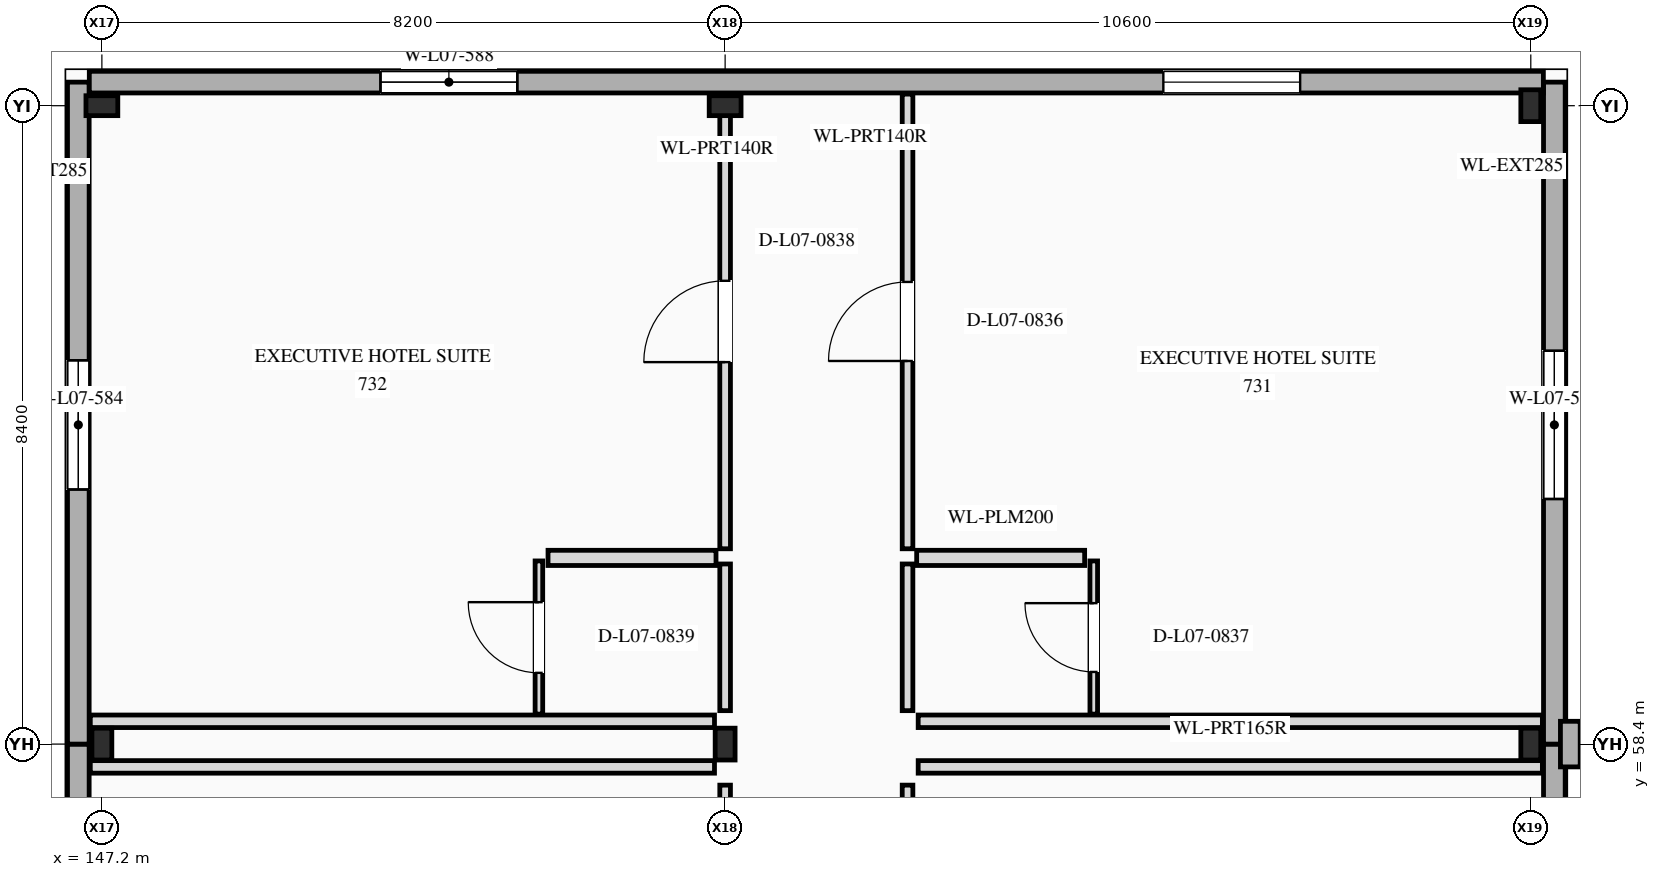
"""IFC4 building model, lengths in metres.
Left out: names, types, materials, properties, quantities, classifications, styles, units other than length and angle.
Written with IfcOpenShell. Run it as: python <this file> out.ifc"""

import sys

from ifc_helpers import new_model, si_unit, direction, frame, frame_2d, origin, origin_2d, place, context, subcontext, project, spatial, rectangle, i_section, extrude, element, fill, save


model = new_model("IFC4")
c1 = context("Model", 3, precision=1e-05, world=origin(), true_north=direction((0.0, 1.0)))
c2 = subcontext(c1, "Body", "Model", "MODEL_VIEW")
j1 = project(units=[si_unit("LENGTHUNIT", "METRE"), si_unit("PLANEANGLEUNIT", "RADIAN")], contexts=[c1])
p1 = place(None, origin())
s1 = spatial("IfcSite", under=j1, at=p1, CompositionType="ELEMENT")
p2 = place(p1, origin())
s2 = spatial("IfcBuilding", under=s1, at=p2, CompositionType="ELEMENT")
p3 = place(p2, frame((0.0, 0.0, 30.6)))
s3 = spatial("IfcBuildingStorey", under=s2, at=p3, CompositionType="ELEMENT", Elevation=30.6)
for number, where, z_axis, x_axis in (
    (1, (147.2, 58.4, 0.0), (0.0, 0.0, 1.0), (1.0, 0.0, 0.0)),
    (2, (147.2, 66.8, 0.0), (0.0, 0.0, 1.0), (0.0, 1.0, 0.0)),
    (3, (155.4, 58.4, 0.0), (0.0, 0.0, 1.0), (1.0, 0.0, 0.0)),
    (4, (155.4, 66.8, 0.0), (0.0, 0.0, 1.0), (0.0, 1.0, 0.0)),
    (5, (166.0, 58.4, 0.0), (0.0, 0.0, 1.0), (1.0, 0.0, 0.0)),
    (6, (166.0, 66.8, 0.0), (0.0, 0.0, 1.0), (1.0, 0.0, 0.0)),
):
    element("IfcColumn", number, at=place(p3, frame(where, z_axis=z_axis, x_axis=x_axis)), inside=s3, PredefinedType="COLUMN", context=c2, shape_type="SweptSolid", body=[
        extrude(i_section(OverallWidth=0.262, OverallDepth=0.419, WebThickness=0.012, FlangeThickness=0.019, at=origin_2d()), origin(), (0.0, 0.0, 1.0), 3.5),
    ])
p4 = place(p3, frame((166.31, 56.26, 0.0), z_axis=(0.0, 0.0, 1.0), x_axis=(0.0, 1.0, 0.0)))
e7 = element("IfcWall", 7, at=p4, inside=s3, PredefinedType="STANDARD", context=c2, shape_type="SweptSolid", body=[
    extrude(rectangle(XDim=2.14, YDim=0.285, at=frame_2d((1.07, 0.0))), origin(), (0.0, 0.0, 1.0), 3.5),
])
p5 = place(p3, frame((166.31, 58.4, 0.0), z_axis=(0.0, 0.0, 1.0), x_axis=(0.0, 1.0, 0.0)))
e8 = element("IfcWall", 8, at=p5, inside=s3, PredefinedType="STANDARD", context=c2, shape_type="SweptSolid", body=[
    extrude(rectangle(XDim=8.71, YDim=0.285, at=frame_2d((4.355, 0.0))), origin(), (0.0, 0.0, 1.0), 3.5),
])
p6 = place(p5, frame((3.225, 0.0, 0.85)))
e9 = element("IfcOpeningElement", 9, at=p6, cuts=e8, PredefinedType="OPENING", context=c2, shape_type="SweptSolid", body=[
    extrude(rectangle(XDim=1.95, YDim=1.85, at=frame_2d((0.975, 0.925))), frame((0.0, 0.152, 0.0), z_axis=(0.0, -1.0, 0.0), x_axis=(1.0, 0.0, 0.0)), (0.0, 0.0, 1.0), 0.305),
])
p7 = place(p3, frame((166.52, 58.1, 0.0), z_axis=(0.0, 0.0, 1.0), x_axis=(0.0, 1.0, 0.0)))
e10 = element("IfcWall", 10, at=p7, inside=s3, PredefinedType="ELEMENTEDWALL", context=c2, shape_type="SweptSolid", body=[
    extrude(rectangle(XDim=0.6, YDim=0.26, at=frame_2d((0.3, 0.0))), origin(), (0.0, 0.0, 1.0), 3.5),
])
p8 = place(p3, frame((146.89, 50.0, 0.0), z_axis=(0.0, 0.0, 1.0), x_axis=(0.0, 1.0, 0.0)))
e11 = element("IfcWall", 11, at=p8, inside=s3, PredefinedType="STANDARD", context=c2, shape_type="SweptSolid", body=[
    extrude(rectangle(XDim=8.4, YDim=0.285, at=frame_2d((4.2, 0.0))), origin(), (0.0, 0.0, 1.0), 3.5),
])
p9 = place(p8, frame((2.95, 0.0, 0.85)))
e12 = element("IfcOpeningElement", 12, at=p9, cuts=e11, PredefinedType="OPENING", context=c2, shape_type="SweptSolid", body=[
    extrude(rectangle(XDim=2.5, YDim=1.75, at=frame_2d((1.25, 0.875))), frame((0.0, 0.152, 0.0), z_axis=(0.0, -1.0, 0.0), x_axis=(1.0, 0.0, 0.0)), (0.0, 0.0, 1.0), 0.305),
])
p10 = place(p3, frame((146.89, 58.4, 0.0), z_axis=(0.0, 0.0, 1.0), x_axis=(0.0, 1.0, 0.0)))
e13 = element("IfcWall", 13, at=p10, inside=s3, PredefinedType="STANDARD", context=c2, shape_type="SweptSolid", body=[
    extrude(rectangle(XDim=8.71, YDim=0.285, at=frame_2d((4.355, 0.0))), origin(), (0.0, 0.0, 1.0), 3.5),
])
p11 = place(p10, frame((3.35, 0.0, 0.85)))
e14 = element("IfcOpeningElement", 14, at=p11, cuts=e13, PredefinedType="OPENING", context=c2, shape_type="SweptSolid", body=[
    extrude(rectangle(XDim=1.7, YDim=1.6, at=frame_2d((0.85, 0.8))), frame((0.0, 0.152, 0.0), z_axis=(0.0, -1.0, 0.0), x_axis=(1.0, 0.0, 0.0)), (0.0, 0.0, 1.0), 0.305),
])
p12 = place(p3, frame((166.166, 67.11, 0.0), z_axis=(0.0, 0.0, 1.0), x_axis=(-1.0, 0.0, 0.0)))
e15 = element("IfcWall", 15, at=p12, inside=s3, PredefinedType="STANDARD", context=c2, shape_type="SweptSolid", body=[
    extrude(rectangle(XDim=19.131, YDim=0.285, at=frame_2d((9.565, 0.0))), origin(), (0.0, 0.0, 1.0), 3.5),
])
p13 = place(p12, frame((3.2, 0.0, 0.88)))
e16 = element("IfcOpeningElement", 16, at=p13, cuts=e15, PredefinedType="OPENING", context=c2, shape_type="SweptSolid", body=[
    extrude(rectangle(XDim=1.8, YDim=1.8, at=frame_2d((0.9, 0.9))), frame((0.0, 0.152, 0.0), z_axis=(0.0, -1.0, 0.0), x_axis=(1.0, 0.0, 0.0)), (0.0, 0.0, 1.0), 0.305),
])
p14 = place(p12, frame((13.5, 0.0, 0.88)))
e17 = element("IfcOpeningElement", 17, at=p14, cuts=e15, PredefinedType="OPENING", context=c2, shape_type="SweptSolid", body=[
    extrude(rectangle(XDim=1.8, YDim=1.8, at=frame_2d((0.9, 0.9))), frame((0.0, 0.152, 0.0), z_axis=(0.0, -1.0, 0.0), x_axis=(1.0, 0.0, 0.0)), (0.0, 0.0, 1.0), 0.305),
])
p15 = place(p3, frame((157.8, 52.57, 0.0), z_axis=(0.0, 0.0, 1.0), x_axis=(0.0, 1.0, 0.0)))
e18 = element("IfcWall", 18, at=p15, inside=s3, PredefinedType="PARTITIONING", context=c2, shape_type="SweptSolid", body=[
    extrude(rectangle(XDim=5.29, YDim=0.14, at=frame_2d((2.645, 0.0))), origin(), (0.0, 0.0, 1.0), 3.2),
])
p16 = place(p15, frame((2.155, 0.0, 0.0)))
e19 = element("IfcOpeningElement", 19, at=p16, cuts=e18, PredefinedType="OPENING", context=c2, shape_type="SweptSolid", body=[
    extrude(rectangle(XDim=0.98, YDim=2.2, at=frame_2d((0.49, 1.1))), frame((0.0, 0.08, 0.0), z_axis=(0.0, -1.0, 0.0), x_axis=(1.0, 0.0, 0.0)), (0.0, 0.0, 1.0), 0.16),
])
p17 = place(p3, frame((157.94, 58.1, 0.0), z_axis=(0.0, 0.0, 1.0), x_axis=(1.0, 0.0, 0.0)))
e20 = element("IfcWall", 20, at=p17, inside=s3, PredefinedType="PARTITIONING", context=c2, shape_type="SweptSolid", body=[
    extrude(rectangle(XDim=8.213, YDim=0.165, at=frame_2d((4.106, 0.0))), origin(), (0.0, 0.0, 1.0), 2.59),
])
p18 = place(p3, frame((155.4, 52.57, 0.0), z_axis=(0.0, 0.0, 1.0), x_axis=(0.0, 1.0, 0.0)))
e21 = element("IfcWall", 21, at=p18, inside=s3, PredefinedType="PARTITIONING", context=c2, shape_type="SweptSolid", body=[
    extrude(rectangle(XDim=5.29, YDim=0.14, at=frame_2d((2.645, 0.0))), origin(), (0.0, 0.0, 1.0), 2.59),
])
p19 = place(p18, frame((2.14, 0.0, 0.0)))
e22 = element("IfcOpeningElement", 22, at=p19, cuts=e21, PredefinedType="OPENING", context=c2, shape_type="SweptSolid", body=[
    extrude(rectangle(XDim=1.01, YDim=2.2, at=frame_2d((0.505, 1.1))), frame((0.0, 0.08, 0.0), z_axis=(0.0, -1.0, 0.0), x_axis=(1.0, 0.0, 0.0)), (0.0, 0.0, 1.0), 0.16),
])
p20 = place(p3, frame((147.048, 58.1, 0.0), z_axis=(0.0, 0.0, 1.0), x_axis=(1.0, 0.0, 0.0)))
e23 = element("IfcWall", 23, at=p20, inside=s3, PredefinedType="PARTITIONING", context=c2, shape_type="SweptSolid", body=[
    extrude(rectangle(XDim=8.212, YDim=0.165, at=frame_2d((4.106, 0.0))), origin(), (0.0, 0.0, 1.0), 2.613),
])
p21 = place(p3, frame((157.8, 58.84, 0.0), z_axis=(0.0, 0.0, 1.0), x_axis=(0.0, 1.0, 0.0)))
e24 = element("IfcWall", 24, at=p21, inside=s3, PredefinedType="PARTITIONING", context=c2, shape_type="SweptSolid", body=[
    extrude(rectangle(XDim=1.93, YDim=0.14, at=frame_2d((0.965, 0.0))), origin(), (0.0, 0.0, 1.0), 2.758),
])
p22 = place(p3, frame((157.8, 60.97, 0.0), z_axis=(0.0, 0.0, 1.0), x_axis=(0.0, 1.0, 0.0)))
e25 = element("IfcWall", 25, at=p22, inside=s3, PredefinedType="PARTITIONING", context=c2, shape_type="SweptSolid", body=[
    extrude(rectangle(XDim=5.982, YDim=0.14, at=frame_2d((2.991, 0.0))), origin(), (0.0, 0.0, 1.0), 2.613),
])
p23 = place(p22, frame((2.471, 0.0, 0.0)))
e26 = element("IfcOpeningElement", 26, at=p23, cuts=e25, PredefinedType="OPENING", context=c2, shape_type="SweptSolid", body=[
    extrude(rectangle(XDim=1.04, YDim=2.25, at=frame_2d((0.52, 1.125))), frame((0.0, 0.08, 0.0), z_axis=(0.0, -1.0, 0.0), x_axis=(1.0, 0.0, 0.0)), (0.0, 0.0, 1.0), 0.16),
])
p24 = place(p3, frame((157.94, 58.7, 0.0), z_axis=(0.0, 0.0, 1.0), x_axis=(1.0, 0.0, 0.0)))
e27 = element("IfcWall", 27, at=p24, inside=s3, PredefinedType="PARTITIONING", context=c2, shape_type="SweptSolid", body=[
    extrude(rectangle(XDim=8.213, YDim=0.165, at=frame_2d((4.106, 0.0))), origin(), (0.0, 0.0, 1.0), 2.59),
])
p25 = place(p3, frame((157.92, 60.85, 0.0), z_axis=(0.0, 0.0, 1.0), x_axis=(1.0, 0.0, 0.0)))
e28 = element("IfcWall", 28, at=p25, inside=s3, PredefinedType="PLUMBINGWALL", context=c2, shape_type="SweptSolid", body=[
    extrude(rectangle(XDim=2.21, YDim=0.2, at=frame_2d((1.105, 0.0))), origin(), (0.0, 0.0, 1.0), 3.2),
])
p26 = place(p3, frame((160.25, 58.794, 0.0), z_axis=(0.0, 0.0, 1.0), x_axis=(0.0, 1.0, 0.0)))
e29 = element("IfcWall", 29, at=p26, inside=s3, PredefinedType="PARTITIONING", context=c2, shape_type="SweptSolid", body=[
    extrude(rectangle(XDim=2.016, YDim=0.1, at=frame_2d((1.008, 0.0))), origin(), (0.0, 0.0, 1.0), 2.758),
])
p27 = place(p26, frame((0.555, 0.0, 0.0)))
e30 = element("IfcOpeningElement", 30, at=p27, cuts=e29, PredefinedType="OPENING", context=c2, shape_type="SweptSolid", body=[
    extrude(rectangle(XDim=0.905, YDim=2.18, at=frame_2d((0.453, 1.09))), frame((0.0, 0.06, 0.0), z_axis=(0.0, -1.0, 0.0), x_axis=(1.0, 0.0, 0.0)), (0.0, 0.0, 1.0), 0.12),
])
p28 = place(p3, frame((155.4, 58.84, 0.0), z_axis=(0.0, 0.0, 1.0), x_axis=(0.0, 1.0, 0.0)))
e31 = element("IfcWall", 31, at=p28, inside=s3, PredefinedType="PARTITIONING", context=c2, shape_type="SweptSolid", body=[
    extrude(rectangle(XDim=1.93, YDim=0.14, at=frame_2d((0.965, 0.0))), origin(), (0.0, 0.0, 1.0), 2.674),
])
p29 = place(p3, frame((155.4, 60.97, 0.0), z_axis=(0.0, 0.0, 1.0), x_axis=(0.0, 1.0, 0.0)))
e32 = element("IfcWall", 32, at=p29, inside=s3, PredefinedType="PARTITIONING", context=c2, shape_type="SweptSolid", body=[
    extrude(rectangle(XDim=5.982, YDim=0.14, at=frame_2d((2.991, 0.0))), origin(), (0.0, 0.0, 1.0), 2.613),
])
p30 = place(p29, frame((2.456, 0.0, 0.0)))
e33 = element("IfcOpeningElement", 33, at=p30, cuts=e32, PredefinedType="OPENING", context=c2, shape_type="SweptSolid", body=[
    extrude(rectangle(XDim=1.07, YDim=2.25, at=frame_2d((0.535, 1.125))), frame((0.0, 0.08, 0.0), z_axis=(0.0, -1.0, 0.0), x_axis=(1.0, 0.0, 0.0)), (0.0, 0.0, 1.0), 0.16),
])
p31 = place(p3, frame((147.048, 58.7, 0.0), z_axis=(0.0, 0.0, 1.0), x_axis=(1.0, 0.0, 0.0)))
e34 = element("IfcWall", 34, at=p31, inside=s3, PredefinedType="PARTITIONING", context=c2, shape_type="SweptSolid", body=[
    extrude(rectangle(XDim=8.212, YDim=0.165, at=frame_2d((4.106, 0.0))), origin(), (0.0, 0.0, 1.0), 2.613),
])
p32 = place(p3, frame((153.07, 60.85, 0.0), z_axis=(0.0, 0.0, 1.0), x_axis=(1.0, 0.0, 0.0)))
e35 = element("IfcWall", 35, at=p32, inside=s3, PredefinedType="PLUMBINGWALL", context=c2, shape_type="SweptSolid", body=[
    extrude(rectangle(XDim=2.21, YDim=0.2, at=frame_2d((1.105, 0.0))), origin(), (0.0, 0.0, 1.0), 3.2),
])
p33 = place(p3, frame((152.95, 58.794, 0.0), z_axis=(0.0, 0.0, 1.0), x_axis=(0.0, 1.0, 0.0)))
e36 = element("IfcWall", 36, at=p33, inside=s3, PredefinedType="PARTITIONING", context=c2, shape_type="SweptSolid", body=[
    extrude(rectangle(XDim=2.016, YDim=0.1, at=frame_2d((1.008, 0.0))), origin(), (0.0, 0.0, 1.0), 2.808),
])
p34 = place(p33, frame((0.543, 0.0, 0.0)))
e37 = element("IfcOpeningElement", 37, at=p34, cuts=e36, PredefinedType="OPENING", context=c2, shape_type="SweptSolid", body=[
    extrude(rectangle(XDim=0.93, YDim=2.22, at=frame_2d((0.465, 1.11))), frame((0.0, 0.06, 0.0), z_axis=(0.0, -1.0, 0.0), x_axis=(1.0, 0.0, 0.0)), (0.0, 0.0, 1.0), 0.12),
])
p35 = place(p6, origin())
e38 = element("IfcWindow", 38, at=p35, inside=s3, PartitioningType="SINGLE_PANEL", PredefinedType="WINDOW", context=c2, shape_type="SweptSolid", body=[
    extrude(rectangle(XDim=1.95, YDim=1.85, at=frame_2d((0.975, 0.925))), frame((0.0, 0.03, 0.0), z_axis=(0.0, -1.0, 0.0), x_axis=(1.0, 0.0, 0.0)), (0.0, 0.0, 1.0), 0.06),
])
fill(e9, e38)
p36 = place(p11, origin())
e39 = element("IfcWindow", 39, at=p36, inside=s3, PartitioningType="SINGLE_PANEL", PredefinedType="WINDOW", context=c2, shape_type="SweptSolid", body=[
    extrude(rectangle(XDim=1.7, YDim=1.6, at=frame_2d((0.85, 0.8))), frame((0.0, 0.03, 0.0), z_axis=(0.0, -1.0, 0.0), x_axis=(1.0, 0.0, 0.0)), (0.0, 0.0, 1.0), 0.06),
])
fill(e14, e39)
p37 = place(p13, origin())
e40 = element("IfcWindow", 40, at=p37, inside=s3, PartitioningType="SINGLE_PANEL", PredefinedType="WINDOW", context=c2, shape_type="SweptSolid", body=[
    extrude(rectangle(XDim=1.8, YDim=1.8, at=frame_2d((0.9, 0.9))), frame((0.0, 0.03, 0.0), z_axis=(0.0, -1.0, 0.0), x_axis=(1.0, 0.0, 0.0)), (0.0, 0.0, 1.0), 0.06),
])
fill(e16, e40)
p38 = place(p14, origin())
e41 = element("IfcWindow", 41, at=p38, inside=s3, PartitioningType="SINGLE_PANEL", PredefinedType="WINDOW", context=c2, shape_type="SweptSolid", body=[
    extrude(rectangle(XDim=1.8, YDim=1.8, at=frame_2d((0.9, 0.9))), frame((0.0, 0.03, 0.0), z_axis=(0.0, -1.0, 0.0), x_axis=(1.0, 0.0, 0.0)), (0.0, 0.0, 1.0), 0.06),
])
fill(e17, e41)
p39 = place(p23, origin())
e42 = element("IfcDoor", 42, at=p39, inside=s3, OperationType="SINGLE_SWING_LEFT", PredefinedType="DOOR", context=c2, shape_type="SweptSolid", body=[
    extrude(rectangle(XDim=1.04, YDim=2.25, at=frame_2d((0.52, 1.125))), frame((0.0, 0.025, 0.0), z_axis=(0.0, -1.0, 0.0), x_axis=(1.0, 0.0, 0.0)), (0.0, 0.0, 1.0), 0.05),
])
fill(e26, e42)
p40 = place(p27, origin())
e43 = element("IfcDoor", 43, at=p40, inside=s3, OperationType="SINGLE_SWING_RIGHT", PredefinedType="DOOR", context=c2, shape_type="SweptSolid", body=[
    extrude(rectangle(XDim=0.905, YDim=2.18, at=frame_2d((0.453, 1.09))), frame((0.0, 0.025, 0.0), z_axis=(0.0, -1.0, 0.0), x_axis=(1.0, 0.0, 0.0)), (0.0, 0.0, 1.0), 0.05),
])
fill(e30, e43)
p41 = place(p30, origin())
e44 = element("IfcDoor", 44, at=p41, inside=s3, OperationType="SINGLE_SWING_LEFT", PredefinedType="DOOR", context=c2, shape_type="SweptSolid", body=[
    extrude(rectangle(XDim=1.07, YDim=2.25, at=frame_2d((0.535, 1.125))), frame((0.0, 0.025, 0.0), z_axis=(0.0, -1.0, 0.0), x_axis=(1.0, 0.0, 0.0)), (0.0, 0.0, 1.0), 0.05),
])
fill(e33, e44)
p42 = place(p34, origin())
e45 = element("IfcDoor", 45, at=p42, inside=s3, OperationType="SINGLE_SWING_RIGHT", PredefinedType="DOOR", context=c2, shape_type="SweptSolid", body=[
    extrude(rectangle(XDim=0.93, YDim=2.22, at=frame_2d((0.465, 1.11))), frame((0.0, 0.025, 0.0), z_axis=(0.0, -1.0, 0.0), x_axis=(1.0, 0.0, 0.0)), (0.0, 0.0, 1.0), 0.05),
])
fill(e37, e45)
save(model, sys.argv[1])
